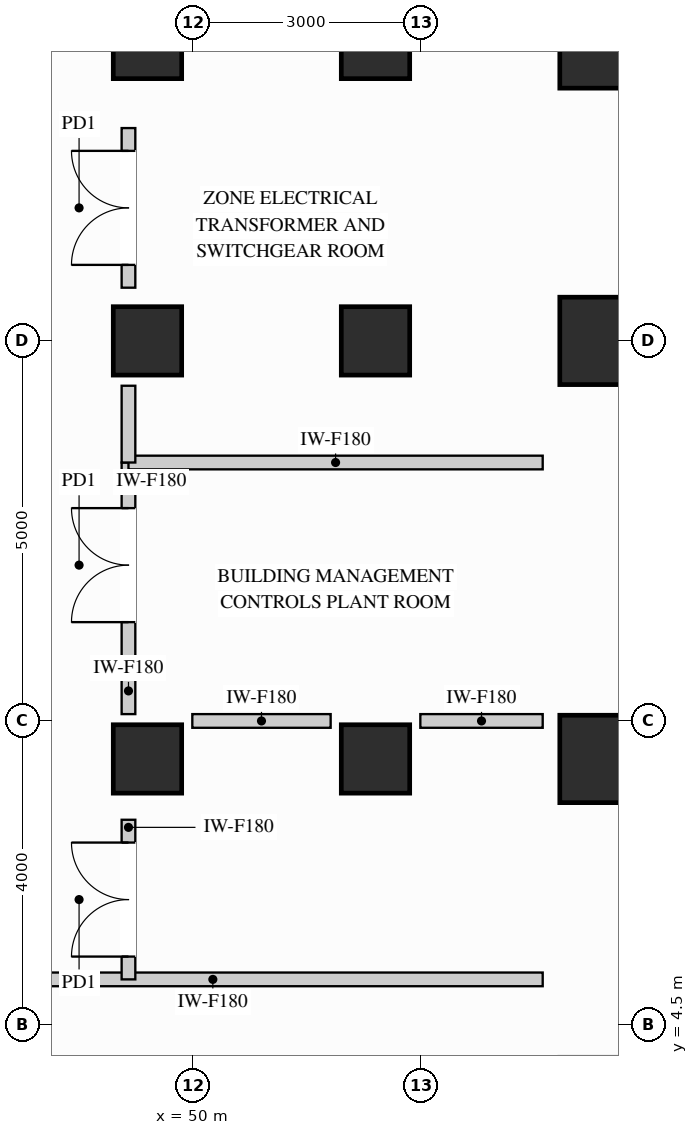
"""IFC4 building model, lengths in metres.
Left out: names, types, materials, properties, quantities, classifications, styles, units other than length and angle.
Written with IfcOpenShell. Run it as: python <this file> out.ifc"""

import sys

from ifc_helpers import new_model, si_unit, direction, frame, frame_2d, origin, origin_2d, place, context, subcontext, project, spatial, rectangle, extrude, source, transform, mapped, element, fill, save


model = new_model("IFC4")
c1 = context("Model", 3, precision=1e-05, world=origin(), true_north=direction((0.0, 1.0)))
c2 = subcontext(c1, "Body", "Model", "MODEL_VIEW")
j1 = project(units=[si_unit("LENGTHUNIT", "METRE"), si_unit("PLANEANGLEUNIT", "RADIAN")], contexts=[c1])
p1 = place(None, origin())
s1 = spatial("IfcSite", under=j1, at=p1, CompositionType="ELEMENT")
p2 = place(p1, origin())
s2 = spatial("IfcBuilding", under=s1, at=p2, CompositionType="ELEMENT")
p3 = place(p2, frame((0.0, 0.0, 138.6)))
s3 = spatial("IfcBuildingStorey", under=s2, at=p3, CompositionType="ELEMENT", Elevation=138.6)
m1 = source(origin(), c2, "Body", "SweptSolid", [
    extrude(rectangle(XDim=0.9, YDim=0.9, at=origin_2d()), origin(), (0.0, 0.0, 1.0), 4.26),
])
for number, where, z_axis, x_axis in (
    (1, (49.4, 13.5, 0.0), (0.0, 0.0, 1.0), (1.0, 0.0, 0.0)),
    (2, (49.4, 17.4, 0.0), (0.0, 0.0, 1.0), (1.0, 0.0, 0.0)),
    (3, (49.4, 8.0, 0.0), (0.0, 0.0, 1.0), (1.0, 0.0, 0.0)),
    (4, (52.4, 13.5, 0.0), (0.0, 0.0, 1.0), (1.0, 0.0, 0.0)),
    (5, (52.4, 17.4, 0.0), (0.0, 0.0, 1.0), (1.0, 0.0, 0.0)),
    (6, (52.4, 8.0, 0.0), (0.0, 0.0, 1.0), (1.0, 0.0, 0.0)),
):
    element("IfcColumn", number, at=place(p3, frame(where, z_axis=z_axis, x_axis=x_axis)), inside=s3, PredefinedType="COLUMN", context=c2, shape_type="MappedRepresentation", body=[
        mapped(m1, transform((0.0, 0.0, 0.0), x_axis=(1.0, 0.0, 0.0), y_axis=(0.0, 1.0, 0.0), z_axis=(0.0, 0.0, 1.0))),
    ])
m2 = source(origin(), c2, "Body", "SweptSolid", [
    extrude(rectangle(XDim=1.15, YDim=1.15, at=origin_2d()), origin(), (0.0, 0.0, 1.0), 4.26),
])
for number, where, z_axis, x_axis in (
    (7, (55.4, 13.5, 0.0), (0.0, 0.0, 1.0), (1.0, 0.0, 0.0)),
    (8, (55.4, 17.4, 0.0), (0.0, 0.0, 1.0), (1.0, 0.0, 0.0)),
    (9, (55.4, 8.0, 0.0), (0.0, 0.0, 1.0), (1.0, 0.0, 0.0)),
):
    element("IfcColumn", number, at=place(p3, frame(where, z_axis=z_axis, x_axis=x_axis)), inside=s3, PredefinedType="COLUMN", context=c2, shape_type="MappedRepresentation", body=[
        mapped(m2, transform((0.0, 0.0, 0.0), x_axis=(1.0, 0.0, 0.0), y_axis=(0.0, 1.0, 0.0), z_axis=(0.0, 0.0, 1.0))),
    ])
p4 = place(p3, frame((49.15, 9.2, 0.0), z_axis=(0.0, 0.0, 1.0), x_axis=(0.0, 1.0, 0.0)))
e10 = element("IfcWall", 10, at=p4, inside=s3, PredefinedType="PARTITIONING", context=c2, shape_type="SweptSolid", body=[
    extrude(rectangle(XDim=2.7, YDim=0.18, at=frame_2d((1.35, 0.0))), origin(), (0.0, 0.0, 1.0), 3.245),
])
p5 = place(p4, frame((0.6, 0.0, 0.0)))
e11 = element("IfcOpeningElement", 11, at=p5, cuts=e10, PredefinedType="OPENING", context=c2, shape_type="SweptSolid", body=[
    extrude(rectangle(XDim=1.5, YDim=2.2, at=frame_2d((0.75, 1.1))), frame((0.0, 0.1, 0.0), z_axis=(0.0, -1.0, 0.0), x_axis=(1.0, 0.0, 0.0)), (0.0, 0.0, 1.0), 0.2),
])
m3 = source(origin(), c2, "Body", "SweptSolid", [
    extrude(rectangle(XDim=5.45, YDim=0.18, at=frame_2d((2.725, 0.0))), origin(), (0.0, 0.0, 1.0), 3.776),
])
p6 = place(p3, frame((49.15, 11.9, 0.0), z_axis=(0.0, 0.0, 1.0), x_axis=(1.0, 0.0, 0.0)))
e12 = element("IfcWall", 12, at=p6, inside=s3, PredefinedType="PARTITIONING", context=c2, shape_type="MappedRepresentation", body=[
    mapped(m3, transform((0.0, 0.0, 0.0), x_axis=(1.0, 0.0, 0.0), y_axis=(0.0, 1.0, 0.0), z_axis=(0.0, 0.0, 1.0))),
])
m4 = source(origin(), c2, "Body", "SweptSolid", [
    extrude(rectangle(XDim=8.68, YDim=0.18, at=frame_2d((4.34, 0.0))), origin(), (0.0, 0.0, 1.0), 4.245),
])
p7 = place(p3, frame((45.92, 5.1, 0.0), z_axis=(0.0, 0.0, 1.0), x_axis=(1.0, 0.0, 0.0)))
e13 = element("IfcWall", 13, at=p7, inside=s3, PredefinedType="PARTITIONING", context=c2, shape_type="MappedRepresentation", body=[
    mapped(m4, transform((0.0, 0.0, 0.0), x_axis=(1.0, 0.0, 0.0), y_axis=(0.0, 1.0, 0.0), z_axis=(0.0, 0.0, 1.0))),
])
p8 = place(p3, frame((49.15, 5.1, 0.0), z_axis=(0.0, 0.0, 1.0), x_axis=(0.0, 1.0, 0.0)))
e14 = element("IfcWall", 14, at=p8, inside=s3, PredefinedType="PARTITIONING", context=c2, shape_type="SweptSolid", body=[
    extrude(rectangle(XDim=2.1, YDim=0.18, at=frame_2d((1.05, 0.0))), origin(), (0.0, 0.0, 1.0), 3.245),
])
p9 = place(p8, frame((0.3, 0.0, 0.0)))
e15 = element("IfcOpeningElement", 15, at=p9, cuts=e14, PredefinedType="OPENING", context=c2, shape_type="SweptSolid", body=[
    extrude(rectangle(XDim=1.5, YDim=2.2, at=frame_2d((0.75, 1.1))), frame((0.0, 0.1, 0.0), z_axis=(0.0, -1.0, 0.0), x_axis=(1.0, 0.0, 0.0)), (0.0, 0.0, 1.0), 0.2),
])
m5 = source(origin(), c2, "Body", "SweptSolid", [
    extrude(rectangle(XDim=1.82, YDim=0.18, at=frame_2d((0.91, 0.0))), origin(), (0.0, 0.0, 1.0), 4.245),
])
p10 = place(p3, frame((49.99, 8.5, 0.0), z_axis=(0.0, 0.0, 1.0), x_axis=(1.0, 0.0, 0.0)))
e16 = element("IfcWall", 16, at=p10, inside=s3, PredefinedType="PARTITIONING", context=c2, shape_type="MappedRepresentation", body=[
    mapped(m5, transform((0.0, 0.0, 0.0), x_axis=(1.0, 0.0, 0.0), y_axis=(0.0, 1.0, 0.0), z_axis=(0.0, 0.0, 1.0))),
])
m6 = source(origin(), c2, "Body", "SweptSolid", [
    extrude(rectangle(XDim=1.61, YDim=0.18, at=frame_2d((0.805, 0.0))), origin(), (0.0, 0.0, 1.0), 4.245),
])
p11 = place(p3, frame((52.99, 8.5, 0.0), z_axis=(0.0, 0.0, 1.0), x_axis=(1.0, 0.0, 0.0)))
e17 = element("IfcWall", 17, at=p11, inside=s3, PredefinedType="PARTITIONING", context=c2, shape_type="MappedRepresentation", body=[
    mapped(m6, transform((0.0, 0.0, 0.0), x_axis=(1.0, 0.0, 0.0), y_axis=(0.0, 1.0, 0.0), z_axis=(0.0, 0.0, 1.0))),
])
m7 = source(origin(), c2, "Body", "SweptSolid", [
    extrude(rectangle(XDim=0.61, YDim=0.18, at=frame_2d((0.305, 0.0))), origin(), (0.0, 0.0, 1.0), 3.245),
])
p12 = place(p3, frame((49.15, 8.59, 0.0), z_axis=(0.0, 0.0, 1.0), x_axis=(0.0, 1.0, 0.0)))
e18 = element("IfcWall", 18, at=p12, inside=s3, PredefinedType="PARTITIONING", context=c2, shape_type="MappedRepresentation", body=[
    mapped(m7, transform((0.0, 0.0, 0.0), x_axis=(1.0, 0.0, 0.0), y_axis=(0.0, 1.0, 0.0), z_axis=(0.0, 0.0, 1.0))),
])
p13 = place(p3, frame((49.15, 14.2, 0.0), z_axis=(0.0, 0.0, 1.0), x_axis=(0.0, 1.0, 0.0)))
e19 = element("IfcWall", 19, at=p13, inside=s3, PredefinedType="PARTITIONING", context=c2, shape_type="SweptSolid", body=[
    extrude(rectangle(XDim=2.1, YDim=0.18, at=frame_2d((1.05, 0.0))), origin(), (0.0, 0.0, 1.0), 3.245),
])
p14 = place(p13, frame((0.3, 0.0, 0.0)))
e20 = element("IfcOpeningElement", 20, at=p14, cuts=e19, PredefinedType="OPENING", context=c2, shape_type="SweptSolid", body=[
    extrude(rectangle(XDim=1.5, YDim=2.2, at=frame_2d((0.75, 1.1))), frame((0.0, 0.1, 0.0), z_axis=(0.0, -1.0, 0.0), x_axis=(1.0, 0.0, 0.0)), (0.0, 0.0, 1.0), 0.2),
])
m8 = source(origin(), c2, "Body", "SweptSolid", [
    extrude(rectangle(XDim=1.01, YDim=0.18, at=frame_2d((0.505, 0.0))), origin(), (0.0, 0.0, 1.0), 3.245),
])
p15 = place(p3, frame((49.15, 11.9, 0.0), z_axis=(0.0, 0.0, 1.0), x_axis=(0.0, 1.0, 0.0)))
e21 = element("IfcWall", 21, at=p15, inside=s3, PredefinedType="PARTITIONING", context=c2, shape_type="MappedRepresentation", body=[
    mapped(m8, transform((0.0, 0.0, 0.0), x_axis=(1.0, 0.0, 0.0), y_axis=(0.0, 1.0, 0.0), z_axis=(0.0, 0.0, 1.0))),
])
m9 = source(origin(), c2, "Body", "SweptSolid", [
    extrude(rectangle(XDim=1.5, YDim=2.2, at=frame_2d((0.75, 1.1))), frame((0.0, 0.025, 0.0), z_axis=(0.0, -1.0, 0.0), x_axis=(1.0, 0.0, 0.0)), (0.0, 0.0, 1.0), 0.05),
])
p16 = place(p5, origin())
e22 = element("IfcDoor", 22, at=p16, inside=s3, OperationType="DOUBLE_DOOR_SINGLE_SWING", PredefinedType="DOOR", context=c2, shape_type="MappedRepresentation", body=[
    mapped(m9, transform((0.0, 0.0, 0.0), x_axis=(1.0, 0.0, 0.0), y_axis=(0.0, 1.0, 0.0), z_axis=(0.0, 0.0, 1.0))),
])
fill(e11, e22)
p17 = place(p9, origin())
e23 = element("IfcDoor", 23, at=p17, inside=s3, OperationType="DOUBLE_DOOR_SINGLE_SWING", PredefinedType="DOOR", context=c2, shape_type="MappedRepresentation", body=[
    mapped(m9, transform((0.0, 0.0, 0.0), x_axis=(1.0, 0.0, 0.0), y_axis=(0.0, 1.0, 0.0), z_axis=(0.0, 0.0, 1.0))),
])
fill(e15, e23)
p18 = place(p14, origin())
e24 = element("IfcDoor", 24, at=p18, inside=s3, OperationType="DOUBLE_DOOR_SINGLE_SWING", PredefinedType="DOOR", context=c2, shape_type="MappedRepresentation", body=[
    mapped(m9, transform((0.0, 0.0, 0.0), x_axis=(1.0, 0.0, 0.0), y_axis=(0.0, 1.0, 0.0), z_axis=(0.0, 0.0, 1.0))),
])
fill(e20, e24)
save(model, sys.argv[1])
